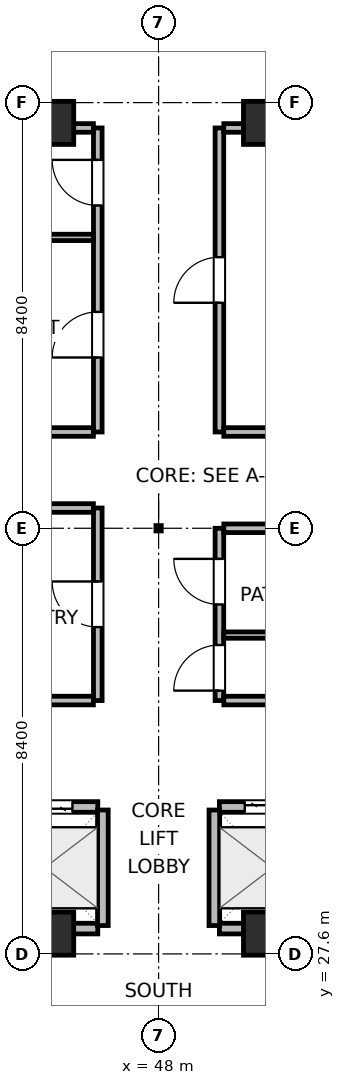
"""IFC4 building model, lengths in metres.
Left out: names, types, materials, properties, quantities, classifications, styles, units other than length and angle.
Written with IfcOpenShell. Run it as: python <this file> out.ifc"""

import sys

from ifc_helpers import new_model, si_unit, direction, frame, frame_2d, origin, origin_2d, place, context, subcontext, project, spatial, rectangle, extrude, element, fill, save


model = new_model("IFC4")
c1 = context("Model", 3, precision=1e-05, world=origin(), true_north=direction((0.0, 1.0)))
c2 = subcontext(c1, "Body", "Model", "MODEL_VIEW")
j1 = project(units=[si_unit("LENGTHUNIT", "METRE"), si_unit("PLANEANGLEUNIT", "RADIAN")], contexts=[c1])
p1 = place(None, origin())
s1 = spatial("IfcSite", under=j1, at=p1, CompositionType="ELEMENT")
p2 = place(p1, origin())
s2 = spatial("IfcBuilding", under=s1, at=p2, CompositionType="ELEMENT")
p3 = place(p2, frame((0.0, 0.0, 29.4)))
s3 = spatial("IfcBuildingStorey", under=s2, at=p3, CompositionType="ELEMENT", Elevation=29.4)
for number, where, z_axis, x_axis in (
    (1, (45.9, 28.0, 0.0), (0.0, 0.0, 1.0), (1.0, 0.0, 0.0)),
    (2, (50.1, 28.0, 0.0), (0.0, 0.0, 1.0), (1.0, 0.0, 0.0)),
    (3, (45.9, 44.0, 0.0), (0.0, 0.0, 1.0), (1.0, 0.0, 0.0)),
    (4, (50.1, 44.0, 0.0), (0.0, 0.0, 1.0), (1.0, 0.0, 0.0)),
):
    element("IfcColumn", number, at=place(p3, frame(where, z_axis=z_axis, x_axis=x_axis)), inside=s3, PredefinedType="COLUMN", context=c2, shape_type="SweptSolid", body=[
        extrude(rectangle(XDim=0.85, YDim=0.85, at=origin_2d()), origin(), (0.0, 0.0, 1.0), 3.9),
    ])
p4 = place(p3, frame((44.7, 30.5, 0.0), z_axis=(0.0, 0.0, 1.0), x_axis=(1.0, 0.0, 0.0)))
e5 = element("IfcWall", 5, at=p4, inside=s3, PredefinedType="PARTITIONING", context=c2, shape_type="SweptSolid", body=[
    extrude(rectangle(XDim=2.1, YDim=0.21, at=frame_2d((1.05, 0.0))), origin(), (0.0, 0.0, 1.0), 3.64),
])
p5 = place(p4, frame((0.5, 0.0, 0.0)))
e6 = element("IfcOpeningElement", 6, at=p5, cuts=e5, PredefinedType="OPENING", context=c2, shape_type="SweptSolid", body=[
    extrude(rectangle(XDim=1.1, YDim=2.04, at=frame_2d((0.55, 1.02))), frame((0.0, 0.115, 0.0), z_axis=(0.0, -1.0, 0.0), x_axis=(1.0, 0.0, 0.0)), (0.0, 0.0, 1.0), 0.23),
])
p6 = place(p3, frame((44.7, 28.1, 0.0), z_axis=(0.0, 0.0, 1.0), x_axis=(1.0, 0.0, 0.0)))
e7 = element("IfcWall", 7, at=p6, inside=s3, PredefinedType="PARTITIONING", context=c2, shape_type="SweptSolid", body=[
    extrude(rectangle(XDim=2.1, YDim=0.21, at=frame_2d((1.05, 0.0))), origin(), (0.0, 0.0, 1.0), 2.525),
])
p7 = place(p3, frame((46.9, 28.16, 0.0), z_axis=(0.0, 0.0, 1.0), x_axis=(0.0, 1.0, 0.0)))
e8 = element("IfcWall", 8, at=p7, inside=s3, PredefinedType="PARTITIONING", context=c2, shape_type="SweptSolid", body=[
    extrude(rectangle(XDim=2.28, YDim=0.21, at=frame_2d((1.14, 0.0))), origin(), (0.0, 0.0, 1.0), 3.64),
])
p8 = place(p3, frame((49.2, 30.5, 0.0), z_axis=(0.0, 0.0, 1.0), x_axis=(1.0, 0.0, 0.0)))
e9 = element("IfcWall", 9, at=p8, inside=s3, PredefinedType="PARTITIONING", context=c2, shape_type="SweptSolid", body=[
    extrude(rectangle(XDim=2.1, YDim=0.21, at=frame_2d((1.05, 0.0))), origin(), (0.0, 0.0, 1.0), 3.64),
])
p9 = place(p8, frame((0.5, 0.0, 0.0)))
e10 = element("IfcOpeningElement", 10, at=p9, cuts=e9, PredefinedType="OPENING", context=c2, shape_type="SweptSolid", body=[
    extrude(rectangle(XDim=1.1, YDim=2.04, at=frame_2d((0.55, 1.02))), frame((0.0, 0.115, 0.0), z_axis=(0.0, -1.0, 0.0), x_axis=(1.0, 0.0, 0.0)), (0.0, 0.0, 1.0), 0.23),
])
p10 = place(p3, frame((49.2, 28.1, 0.0), z_axis=(0.0, 0.0, 1.0), x_axis=(1.0, 0.0, 0.0)))
e11 = element("IfcWall", 11, at=p10, inside=s3, PredefinedType="PARTITIONING", context=c2, shape_type="SweptSolid", body=[
    extrude(rectangle(XDim=2.1, YDim=0.21, at=frame_2d((1.05, 0.0))), origin(), (0.0, 0.0, 1.0), 2.525),
])
p11 = place(p3, frame((49.1, 28.16, 0.0), z_axis=(0.0, 0.0, 1.0), x_axis=(0.0, 1.0, 0.0)))
e12 = element("IfcWall", 12, at=p11, inside=s3, PredefinedType="PARTITIONING", context=c2, shape_type="SweptSolid", body=[
    extrude(rectangle(XDim=2.28, YDim=0.21, at=frame_2d((1.14, 0.0))), origin(), (0.0, 0.0, 1.0), 3.64),
])
p12 = place(p3, frame((46.8, 32.6, 0.0), z_axis=(0.0, 0.0, 1.0), x_axis=(0.0, 1.0, 0.0)))
e13 = element("IfcWall", 13, at=p12, inside=s3, PredefinedType="PARTITIONING", context=c2, shape_type="SweptSolid", body=[
    extrude(rectangle(XDim=3.8, YDim=0.17, at=frame_2d((1.9, 0.0))), origin(), (0.0, 0.0, 1.0), 3.64),
])
p13 = place(p12, frame((1.45, 0.0, 0.0)))
e14 = element("IfcOpeningElement", 14, at=p13, cuts=e13, PredefinedType="OPENING", context=c2, shape_type="SweptSolid", body=[
    extrude(rectangle(XDim=0.9, YDim=2.02, at=frame_2d((0.45, 1.01))), frame((0.0, 0.095, 0.0), z_axis=(0.0, -1.0, 0.0), x_axis=(1.0, 0.0, 0.0)), (0.0, 0.0, 1.0), 0.19),
])
for number, where, z_axis, x_axis in (
    (15, (43.8, 32.6, 0.0), (0.0, 0.0, 1.0), (1.0, 0.0, 0.0)),
    (16, (43.8, 36.4, 0.0), (0.0, 0.0, 1.0), (1.0, 0.0, 0.0)),
):
    element("IfcWall", number, at=place(p3, frame(where, z_axis=z_axis, x_axis=x_axis)), inside=s3, PredefinedType="PARTITIONING", context=c2, shape_type="SweptSolid", body=[
        extrude(rectangle(XDim=2.913, YDim=0.17, at=frame_2d((1.457, 0.0))), origin(), (0.0, 0.0, 1.0), 3.64),
    ])
p14 = place(p3, frame((49.2, 32.6, 0.0), z_axis=(0.0, 0.0, 1.0), x_axis=(0.0, 1.0, 0.0)))
e17 = element("IfcWall", 17, at=p14, inside=s3, PredefinedType="PARTITIONING", context=c2, shape_type="SweptSolid", body=[
    extrude(rectangle(XDim=3.4, YDim=0.17, at=frame_2d((1.7, 0.0))), origin(), (0.0, 0.0, 1.0), 3.64),
])
p15 = place(p14, frame((0.196, 0.0, 0.0)))
e18 = element("IfcOpeningElement", 18, at=p15, cuts=e17, PredefinedType="OPENING", context=c2, shape_type="SweptSolid", body=[
    extrude(rectangle(XDim=0.9, YDim=2.02, at=frame_2d((0.45, 1.01))), frame((0.0, 0.095, 0.0), z_axis=(0.0, -1.0, 0.0), x_axis=(1.0, 0.0, 0.0)), (0.0, 0.0, 1.0), 0.19),
])
p16 = place(p14, frame((1.896, 0.0, 0.0)))
e19 = element("IfcOpeningElement", 19, at=p16, cuts=e17, PredefinedType="OPENING", context=c2, shape_type="SweptSolid", body=[
    extrude(rectangle(XDim=0.9, YDim=2.02, at=frame_2d((0.45, 1.01))), frame((0.0, 0.095, 0.0), z_axis=(0.0, -1.0, 0.0), x_axis=(1.0, 0.0, 0.0)), (0.0, 0.0, 1.0), 0.19),
])
for number, where, z_axis, x_axis in (
    (20, (49.287, 32.6, 0.0), (0.0, 0.0, 1.0), (1.0, 0.0, 0.0)),
    (21, (49.287, 36.0, 0.0), (0.0, 0.0, 1.0), (1.0, 0.0, 0.0)),
):
    element("IfcWall", number, at=place(p3, frame(where, z_axis=z_axis, x_axis=x_axis)), inside=s3, PredefinedType="PARTITIONING", context=c2, shape_type="SweptSolid", body=[
        extrude(rectangle(XDim=2.913, YDim=0.17, at=frame_2d((1.457, 0.0))), origin(), (0.0, 0.0, 1.0), 3.64),
    ])
p17 = place(p3, frame((49.287, 33.892, 0.0), z_axis=(0.0, 0.0, 1.0), x_axis=(1.0, 0.0, 0.0)))
e22 = element("IfcWall", 22, at=p17, inside=s3, PredefinedType="PARTITIONING", context=c2, shape_type="SweptSolid", body=[
    extrude(rectangle(XDim=2.913, YDim=0.125, at=frame_2d((1.457, 0.0))), origin(), (0.0, 0.0, 1.0), 3.64),
])
p18 = place(p3, frame((46.8, 37.9, 0.0), z_axis=(0.0, 0.0, 1.0), x_axis=(0.0, 1.0, 0.0)))
e23 = element("IfcWall", 23, at=p18, inside=s3, PredefinedType="PARTITIONING", context=c2, shape_type="SweptSolid", body=[
    extrude(rectangle(XDim=6.0, YDim=0.17, at=frame_2d((3.0, 0.0))), origin(), (0.0, 0.0, 1.0), 3.64),
])
p19 = place(p18, frame((1.47, 0.0, 0.0)))
e24 = element("IfcOpeningElement", 24, at=p19, cuts=e23, PredefinedType="OPENING", context=c2, shape_type="SweptSolid", body=[
    extrude(rectangle(XDim=0.9, YDim=2.02, at=frame_2d((0.45, 1.01))), frame((0.0, 0.095, 0.0), z_axis=(0.0, -1.0, 0.0), x_axis=(1.0, 0.0, 0.0)), (0.0, 0.0, 1.0), 0.19),
])
p20 = place(p18, frame((4.47, 0.0, 0.0)))
e25 = element("IfcOpeningElement", 25, at=p20, cuts=e23, PredefinedType="OPENING", context=c2, shape_type="SweptSolid", body=[
    extrude(rectangle(XDim=0.9, YDim=2.02, at=frame_2d((0.45, 1.01))), frame((0.0, 0.095, 0.0), z_axis=(0.0, -1.0, 0.0), x_axis=(1.0, 0.0, 0.0)), (0.0, 0.0, 1.0), 0.19),
])
p21 = place(p3, frame((42.5, 37.9, 0.0), z_axis=(0.0, 0.0, 1.0), x_axis=(1.0, 0.0, 0.0)))
e26 = element("IfcWall", 26, at=p21, inside=s3, PredefinedType="PARTITIONING", context=c2, shape_type="SweptSolid", body=[
    extrude(rectangle(XDim=4.213, YDim=0.17, at=frame_2d((2.106, 0.0))), origin(), (0.0, 0.0, 1.0), 3.64),
])
p22 = place(p3, frame((42.5, 43.9, 0.0), z_axis=(0.0, 0.0, 1.0), x_axis=(1.0, 0.0, 0.0)))
e27 = element("IfcWall", 27, at=p22, inside=s3, PredefinedType="PARTITIONING", context=c2, shape_type="SweptSolid", body=[
    extrude(rectangle(XDim=4.213, YDim=0.17, at=frame_2d((2.106, 0.0))), origin(), (0.0, 0.0, 1.0), 2.525),
])
p23 = place(p3, frame((42.5, 41.74, 0.0), z_axis=(0.0, 0.0, 1.0), x_axis=(1.0, 0.0, 0.0)))
e28 = element("IfcWall", 28, at=p23, inside=s3, PredefinedType="PARTITIONING", context=c2, shape_type="SweptSolid", body=[
    extrude(rectangle(XDim=4.213, YDim=0.125, at=frame_2d((2.106, 0.0))), origin(), (0.0, 0.0, 1.0), 3.64),
])
p24 = place(p3, frame((49.2, 37.9, 0.0), z_axis=(0.0, 0.0, 1.0), x_axis=(0.0, 1.0, 0.0)))
e29 = element("IfcWall", 29, at=p24, inside=s3, PredefinedType="PARTITIONING", context=c2, shape_type="SweptSolid", body=[
    extrude(rectangle(XDim=6.0, YDim=0.17, at=frame_2d((3.0, 0.0))), origin(), (0.0, 0.0, 1.0), 3.64),
])
p25 = place(p24, frame((2.55, 0.0, 0.0)))
e30 = element("IfcOpeningElement", 30, at=p25, cuts=e29, PredefinedType="OPENING", context=c2, shape_type="SweptSolid", body=[
    extrude(rectangle(XDim=0.9, YDim=2.02, at=frame_2d((0.45, 1.01))), frame((0.0, 0.095, 0.0), z_axis=(0.0, -1.0, 0.0), x_axis=(1.0, 0.0, 0.0)), (0.0, 0.0, 1.0), 0.19),
])
p26 = place(p3, frame((49.287, 37.9, 0.0), z_axis=(0.0, 0.0, 1.0), x_axis=(1.0, 0.0, 0.0)))
e31 = element("IfcWall", 31, at=p26, inside=s3, PredefinedType="PARTITIONING", context=c2, shape_type="SweptSolid", body=[
    extrude(rectangle(XDim=4.113, YDim=0.17, at=frame_2d((2.056, 0.0))), origin(), (0.0, 0.0, 1.0), 3.64),
])
p27 = place(p3, frame((49.287, 43.9, 0.0), z_axis=(0.0, 0.0, 1.0), x_axis=(1.0, 0.0, 0.0)))
e32 = element("IfcWall", 32, at=p27, inside=s3, PredefinedType="PARTITIONING", context=c2, shape_type="SweptSolid", body=[
    extrude(rectangle(XDim=4.113, YDim=0.17, at=frame_2d((2.056, 0.0))), origin(), (0.0, 0.0, 1.0), 2.525),
])
p28 = place(p5, origin())
e33 = element("IfcDoor", 33, at=p28, inside=s3, OperationType="DOUBLE_DOOR_SLIDING", PredefinedType="DOOR", context=c2, shape_type="SweptSolid", body=[
    extrude(rectangle(XDim=1.1, YDim=2.04, at=frame_2d((0.55, 1.02))), frame((0.0, 0.025, 0.0), z_axis=(0.0, -1.0, 0.0), x_axis=(1.0, 0.0, 0.0)), (0.0, 0.0, 1.0), 0.05),
])
fill(e6, e33)
p29 = place(p9, origin())
e34 = element("IfcDoor", 34, at=p29, inside=s3, OperationType="DOUBLE_DOOR_SLIDING", PredefinedType="DOOR", context=c2, shape_type="SweptSolid", body=[
    extrude(rectangle(XDim=1.1, YDim=2.04, at=frame_2d((0.55, 1.02))), frame((0.0, 0.025, 0.0), z_axis=(0.0, -1.0, 0.0), x_axis=(1.0, 0.0, 0.0)), (0.0, 0.0, 1.0), 0.05),
])
fill(e10, e34)
p30 = place(p13, origin())
e35 = element("IfcDoor", 35, at=p30, inside=s3, OperationType="SINGLE_SWING_RIGHT", PredefinedType="DOOR", context=c2, shape_type="SweptSolid", body=[
    extrude(rectangle(XDim=0.9, YDim=2.02, at=frame_2d((0.45, 1.01))), frame((0.0, 0.025, 0.0), z_axis=(0.0, -1.0, 0.0), x_axis=(1.0, 0.0, 0.0)), (0.0, 0.0, 1.0), 0.05),
])
fill(e14, e35)
p31 = place(p15, origin())
e36 = element("IfcDoor", 36, at=p31, inside=s3, OperationType="SINGLE_SWING_LEFT", PredefinedType="DOOR", context=c2, shape_type="SweptSolid", body=[
    extrude(rectangle(XDim=0.9, YDim=2.02, at=frame_2d((0.45, 1.01))), frame((0.0, 0.025, 0.0), z_axis=(0.0, -1.0, 0.0), x_axis=(1.0, 0.0, 0.0)), (0.0, 0.0, 1.0), 0.05),
])
fill(e18, e36)
p32 = place(p16, origin())
e37 = element("IfcDoor", 37, at=p32, inside=s3, OperationType="SINGLE_SWING_RIGHT", PredefinedType="DOOR", context=c2, shape_type="SweptSolid", body=[
    extrude(rectangle(XDim=0.9, YDim=2.02, at=frame_2d((0.45, 1.01))), frame((0.0, 0.025, 0.0), z_axis=(0.0, -1.0, 0.0), x_axis=(1.0, 0.0, 0.0)), (0.0, 0.0, 1.0), 0.05),
])
fill(e19, e37)
p33 = place(p19, origin())
e38 = element("IfcDoor", 38, at=p33, inside=s3, OperationType="SINGLE_SWING_LEFT", PredefinedType="DOOR", context=c2, shape_type="SweptSolid", body=[
    extrude(rectangle(XDim=0.9, YDim=2.02, at=frame_2d((0.45, 1.01))), frame((0.0, 0.025, 0.0), z_axis=(0.0, -1.0, 0.0), x_axis=(1.0, 0.0, 0.0)), (0.0, 0.0, 1.0), 0.05),
])
fill(e24, e38)
p34 = place(p20, origin())
e39 = element("IfcDoor", 39, at=p34, inside=s3, OperationType="SINGLE_SWING_RIGHT", PredefinedType="DOOR", context=c2, shape_type="SweptSolid", body=[
    extrude(rectangle(XDim=0.9, YDim=2.02, at=frame_2d((0.45, 1.01))), frame((0.0, 0.025, 0.0), z_axis=(0.0, -1.0, 0.0), x_axis=(1.0, 0.0, 0.0)), (0.0, 0.0, 1.0), 0.05),
])
fill(e25, e39)
p35 = place(p25, origin())
e40 = element("IfcDoor", 40, at=p35, inside=s3, OperationType="SINGLE_SWING_LEFT", PredefinedType="DOOR", context=c2, shape_type="SweptSolid", body=[
    extrude(rectangle(XDim=0.9, YDim=2.02, at=frame_2d((0.45, 1.01))), frame((0.0, 0.025, 0.0), z_axis=(0.0, -1.0, 0.0), x_axis=(1.0, 0.0, 0.0)), (0.0, 0.0, 1.0), 0.05),
])
fill(e30, e40)
save(model, sys.argv[1])
